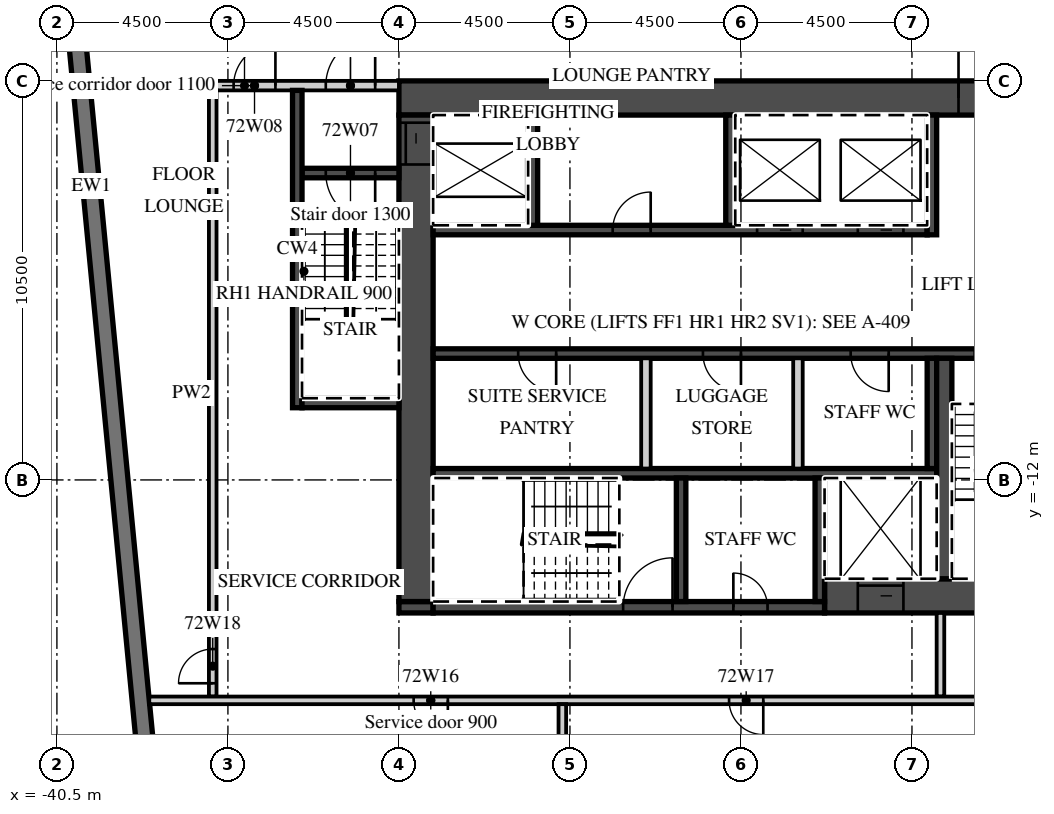
"""IFC4 building model, lengths in metres.
Left out: names, types, materials, properties, quantities, classifications, styles, units other than length and angle.
Written with IfcOpenShell. Run it as: python <this file> out.ifc"""

import sys

from ifc_helpers import new_model, si_unit, direction, frame, frame_2d, origin, place, context, subcontext, project, spatial, rectangle, extrude, element, fill, save


model = new_model("IFC4")
c1 = context("Model", 3, precision=1e-05, world=origin(), true_north=direction((0.0, 1.0)))
c2 = subcontext(c1, "Body", "Model", "MODEL_VIEW")
j1 = project(units=[si_unit("LENGTHUNIT", "METRE"), si_unit("PLANEANGLEUNIT", "RADIAN")], contexts=[c1])
p1 = place(None, origin())
s1 = spatial("IfcSite", under=j1, at=p1, CompositionType="ELEMENT")
p2 = place(p1, origin())
s2 = spatial("IfcBuilding", under=s1, at=p2, CompositionType="ELEMENT")
p3 = place(p2, frame((0.0, 0.0, 288.3)))
s3 = spatial("IfcBuildingStorey", under=s2, at=p3, CompositionType="ELEMENT", Elevation=288.3)
p4 = place(p3, frame((-41.132, 11.658, 0.0), z_axis=(0.0, 0.0, 1.0), x_axis=(0.095847749461, -0.995396006082, 0.0)))
e1 = element("IfcWall", 1, at=p4, inside=s3, PredefinedType="SOLIDWALL", context=c2, shape_type="SweptSolid", body=[
    extrude(rectangle(XDim=32.0, YDim=0.45, at=frame_2d((16.0, 0.0))), origin(), (0.0, 0.0, 1.0), 3.02),
])
p5 = place(p4, frame((2.053, 0.0, 0.45)))
e2 = element("IfcOpeningElement", 2, at=p5, cuts=e1, PredefinedType="OPENING", context=c2, shape_type="SweptSolid", body=[
    extrude(rectangle(XDim=3.3, YDim=2.25, at=frame_2d((1.65, 1.125))), frame((0.0, 0.235, 0.0), z_axis=(0.0, -1.0, 0.0), x_axis=(1.0, 0.0, 0.0)), (0.0, 0.0, 1.0), 0.47),
])
p6 = place(p4, frame((6.574, 0.0, 0.45)))
e3 = element("IfcOpeningElement", 3, at=p6, cuts=e1, PredefinedType="OPENING", context=c2, shape_type="SweptSolid", body=[
    extrude(rectangle(XDim=3.3, YDim=2.25, at=frame_2d((1.65, 1.125))), frame((0.0, 0.235, 0.0), z_axis=(0.0, -1.0, 0.0), x_axis=(1.0, 0.0, 0.0)), (0.0, 0.0, 1.0), 0.47),
])
p7 = place(p3, frame((-31.5, -1.95, 0.0), z_axis=(0.0, 0.0, 1.0), x_axis=(1.0, 0.0, 0.0)))
e4 = element("IfcWall", 4, at=p7, inside=s3, PredefinedType="SHEAR", context=c2, shape_type="SweptSolid", body=[
    extrude(rectangle(XDim=18.0, YDim=0.9, at=frame_2d((9.0, 0.0))), origin(), (0.0, 0.0, 1.0), 3.02),
])
p8 = place(p7, frame((14.725, 0.0, 0.0)))
e5 = element("IfcOpeningElement", 5, at=p8, cuts=e4, PredefinedType="OPENING", context=c2, shape_type="SweptSolid", body=[
    extrude(rectangle(XDim=1.8, YDim=2.1, at=frame_2d((0.9, 1.05))), frame((0.0, 0.46, 0.0), z_axis=(0.0, -1.0, 0.0), x_axis=(1.0, 0.0, 0.0)), (0.0, 0.0, 1.0), 0.92),
])
p9 = place(p3, frame((-20.3, -15.05, 0.0), z_axis=(0.0, 0.0, 1.0), x_axis=(1.0, 0.0, 0.0)))
e6 = element("IfcWall", 6, at=p9, inside=s3, PredefinedType="SHEAR", context=c2, shape_type="SweptSolid", body=[
    extrude(rectangle(XDim=6.8, YDim=0.9, at=frame_2d((3.4, 0.0))), origin(), (0.0, 0.0, 1.0), 3.02),
])
p10 = place(p9, frame((0.875, 0.0, 0.0)))
e7 = element("IfcOpeningElement", 7, at=p10, cuts=e6, PredefinedType="OPENING", context=c2, shape_type="SweptSolid", body=[
    extrude(rectangle(XDim=1.2, YDim=2.1, at=frame_2d((0.6, 1.05))), frame((0.0, 0.46, 0.0), z_axis=(0.0, -1.0, 0.0), x_axis=(1.0, 0.0, 0.0)), (0.0, 0.0, 1.0), 0.92),
])
p11 = place(p3, frame((-31.5, -15.35, 0.0), z_axis=(0.0, 0.0, 1.0), x_axis=(1.0, 0.0, 0.0)))
e8 = element("IfcWall", 8, at=p11, inside=s3, PredefinedType="SHEAR", context=c2, shape_type="SweptSolid", body=[
    extrude(rectangle(XDim=0.9, YDim=0.3, at=frame_2d((0.45, 0.0))), origin(), (0.0, 0.0, 1.0), 3.02),
])
p12 = place(p3, frame((-30.6, -15.35, 0.0), z_axis=(0.0, 0.0, 1.0), x_axis=(1.0, 0.0, 0.0)))
e9 = element("IfcWall", 9, at=p12, inside=s3, PredefinedType="SHEAR", context=c2, shape_type="SweptSolid", body=[
    extrude(rectangle(XDim=10.3, YDim=0.3, at=frame_2d((5.15, 0.0))), origin(), (0.0, 0.0, 1.0), 3.02),
])
p13 = place(p12, frame((5.0, 0.0, 0.0)))
e10 = element("IfcOpeningElement", 10, at=p13, cuts=e9, PredefinedType="OPENING", context=c2, shape_type="SweptSolid", body=[
    extrude(rectangle(XDim=1.3, YDim=2.1, at=frame_2d((0.65, 1.05))), frame((0.0, 0.16, 0.0), z_axis=(0.0, -1.0, 0.0), x_axis=(1.0, 0.0, 0.0)), (0.0, 0.0, 1.0), 0.32),
])
p14 = place(p12, frame((7.9, 0.0, 0.0)))
e11 = element("IfcOpeningElement", 11, at=p14, cuts=e9, PredefinedType="OPENING", context=c2, shape_type="SweptSolid", body=[
    extrude(rectangle(XDim=0.9, YDim=2.1, at=frame_2d((0.45, 1.05))), frame((0.0, 0.16, 0.0), z_axis=(0.0, -1.0, 0.0), x_axis=(1.0, 0.0, 0.0)), (0.0, 0.0, 1.0), 0.32),
])
p15 = place(p3, frame((-31.05, -15.2, 0.0), z_axis=(0.0, 0.0, 1.0), x_axis=(0.0, 1.0, 0.0)))
e12 = element("IfcWall", 12, at=p15, inside=s3, PredefinedType="SHEAR", context=c2, shape_type="SweptSolid", body=[
    extrude(rectangle(XDim=12.8, YDim=0.9, at=frame_2d((6.4, 0.0))), origin(), (0.0, 0.0, 1.0), 3.02),
])
p16 = place(p15, frame((11.5, 0.0, 0.0)))
e13 = element("IfcOpeningElement", 13, at=p16, cuts=e12, PredefinedType="OPENING", context=c2, shape_type="SweptSolid", body=[
    extrude(rectangle(XDim=1.1, YDim=2.1, at=frame_2d((0.55, 1.05))), frame((0.0, 0.46, 0.0), z_axis=(0.0, -1.0, 0.0), x_axis=(1.0, 0.0, 0.0)), (0.0, 0.0, 1.0), 0.92),
])
p17 = place(p3, frame((-30.6, -5.425, 0.0), z_axis=(0.0, 0.0, 1.0), x_axis=(1.0, 0.0, 0.0)))
e14 = element("IfcWall", 14, at=p17, inside=s3, PredefinedType="SHEAR", context=c2, shape_type="SweptSolid", body=[
    extrude(rectangle(XDim=13.0, YDim=0.25, at=frame_2d((6.5, 0.0))), origin(), (0.0, 0.0, 1.0), 3.02),
])
p18 = place(p17, frame((8.525, 0.0, 0.0)))
e15 = element("IfcOpeningElement", 15, at=p18, cuts=e14, PredefinedType="OPENING", context=c2, shape_type="SweptSolid", body=[
    extrude(rectangle(XDim=1.2, YDim=2.1, at=frame_2d((0.6, 1.05))), frame((0.0, 0.135, 0.0), z_axis=(0.0, -1.0, 0.0), x_axis=(1.0, 0.0, 0.0)), (0.0, 0.0, 1.0), 0.27),
])
p19 = place(p17, frame((11.175, 0.0, 0.0)))
e16 = element("IfcOpeningElement", 16, at=p19, cuts=e14, PredefinedType="OPENING", context=c2, shape_type="SweptSolid", body=[
    extrude(rectangle(XDim=1.2, YDim=2.1, at=frame_2d((0.6, 1.05))), frame((0.0, 0.135, 0.0), z_axis=(0.0, -1.0, 0.0), x_axis=(1.0, 0.0, 0.0)), (0.0, 0.0, 1.0), 0.27),
])
p20 = place(p17, frame((4.725, 0.0, 0.0)))
e17 = element("IfcOpeningElement", 17, at=p20, cuts=e14, PredefinedType="OPENING", context=c2, shape_type="SweptSolid", body=[
    extrude(rectangle(XDim=1.0, YDim=2.1, at=frame_2d((0.5, 1.05))), frame((0.0, 0.135, 0.0), z_axis=(0.0, -1.0, 0.0), x_axis=(1.0, 0.0, 0.0)), (0.0, 0.0, 1.0), 0.27),
])
p21 = place(p3, frame((-17.475, -5.55, 0.0), z_axis=(0.0, 0.0, 1.0), x_axis=(0.0, 1.0, 0.0)))
e18 = element("IfcWall", 18, at=p21, inside=s3, PredefinedType="SHEAR", context=c2, shape_type="SweptSolid", body=[
    extrude(rectangle(XDim=3.15, YDim=0.25, at=frame_2d((1.575, 0.0))), origin(), (0.0, 0.0, 1.0), 3.02),
])
for number, where, z_axis, x_axis in (
    (19, (-27.975, -5.3, 0.0), (0.0, 0.0, 1.0), (0.0, 1.0, 0.0)),
    (20, (-22.775, -5.3, 0.0), (0.0, 0.0, 1.0), (0.0, 1.0, 0.0)),
):
    element("IfcWall", number, at=place(p3, frame(where, z_axis=z_axis, x_axis=x_axis)), inside=s3, PredefinedType="SHEAR", context=c2, shape_type="SweptSolid", body=[
        extrude(rectangle(XDim=2.9, YDim=0.25, at=frame_2d((1.45, 0.0))), origin(), (0.0, 0.0, 1.0), 3.02),
    ])
p22 = place(p3, frame((-30.6, -8.675, 0.0), z_axis=(0.0, 0.0, 1.0), x_axis=(1.0, 0.0, 0.0)))
e21 = element("IfcWall", 21, at=p22, inside=s3, PredefinedType="SHEAR", context=c2, shape_type="SweptSolid", body=[
    extrude(rectangle(XDim=16.2, YDim=0.25, at=frame_2d((8.1, 0.0))), origin(), (0.0, 0.0, 1.0), 3.02),
])
p23 = place(p22, frame((14.25, 0.0, 0.0)))
e22 = element("IfcOpeningElement", 22, at=p23, cuts=e21, PredefinedType="OPENING", context=c2, shape_type="SweptSolid", body=[
    extrude(rectangle(XDim=1.3, YDim=2.1, at=frame_2d((0.65, 1.05))), frame((0.0, 0.135, 0.0), z_axis=(0.0, -1.0, 0.0), x_axis=(1.0, 0.0, 0.0)), (0.0, 0.0, 1.0), 0.27),
])
p24 = place(p22, frame((2.238, 0.0, 0.0)))
e23 = element("IfcOpeningElement", 23, at=p24, cuts=e21, PredefinedType="OPENING", context=c2, shape_type="SweptSolid", body=[
    extrude(rectangle(XDim=1.0, YDim=2.1, at=frame_2d((0.5, 1.05))), frame((0.0, 0.135, 0.0), z_axis=(0.0, -1.0, 0.0), x_axis=(1.0, 0.0, 0.0)), (0.0, 0.0, 1.0), 0.27),
])
p25 = place(p22, frame((7.1, 0.0, 0.0)))
e24 = element("IfcOpeningElement", 24, at=p25, cuts=e21, PredefinedType="OPENING", context=c2, shape_type="SweptSolid", body=[
    extrude(rectangle(XDim=1.0, YDim=2.1, at=frame_2d((0.5, 1.05))), frame((0.0, 0.135, 0.0), z_axis=(0.0, -1.0, 0.0), x_axis=(1.0, 0.0, 0.0)), (0.0, 0.0, 1.0), 0.27),
])
p26 = place(p22, frame((10.988, 0.0, 0.0)))
e25 = element("IfcOpeningElement", 25, at=p26, cuts=e21, PredefinedType="OPENING", context=c2, shape_type="SweptSolid", body=[
    extrude(rectangle(XDim=1.0, YDim=2.1, at=frame_2d((0.5, 1.05))), frame((0.0, 0.135, 0.0), z_axis=(0.0, -1.0, 0.0), x_axis=(1.0, 0.0, 0.0)), (0.0, 0.0, 1.0), 0.27),
])
p27 = place(p3, frame((-30.6, -11.825, 0.0), z_axis=(0.0, 0.0, 1.0), x_axis=(1.0, 0.0, 0.0)))
e26 = element("IfcWall", 26, at=p27, inside=s3, PredefinedType="SHEAR", context=c2, shape_type="SweptSolid", body=[
    extrude(rectangle(XDim=13.25, YDim=0.25, at=frame_2d((6.625, 0.0))), origin(), (0.0, 0.0, 1.0), 3.02),
])
p28 = place(p3, frame((-17.475, -11.7, 0.0), z_axis=(0.0, 0.0, 1.0), x_axis=(0.0, 1.0, 0.0)))
e27 = element("IfcWall", 27, at=p28, inside=s3, PredefinedType="SHEAR", context=c2, shape_type="SweptSolid", body=[
    extrude(rectangle(XDim=2.9, YDim=0.25, at=frame_2d((1.45, 0.0))), origin(), (0.0, 0.0, 1.0), 3.02),
])
for number, where, z_axis, x_axis in (
    (28, (-25.0, -11.7, 0.0), (0.0, 0.0, 1.0), (0.0, 1.0, 0.0)),
    (29, (-21.0, -11.7, 0.0), (0.0, 0.0, 1.0), (0.0, 1.0, 0.0)),
):
    element("IfcWall", number, at=place(p3, frame(where, z_axis=z_axis, x_axis=x_axis)), inside=s3, PredefinedType="PARTITIONING", context=c2, shape_type="SweptSolid", body=[
        extrude(rectangle(XDim=2.9, YDim=0.25, at=frame_2d((1.45, 0.0))), origin(), (0.0, 0.0, 1.0), 3.02),
    ])
p29 = place(p3, frame((-17.15, -14.6, 0.0), z_axis=(0.0, 0.0, 1.0), x_axis=(0.0, 1.0, 0.0)))
e30 = element("IfcWall", 30, at=p29, inside=s3, PredefinedType="SHEAR", context=c2, shape_type="SweptSolid", body=[
    extrude(rectangle(XDim=5.8, YDim=0.4, at=frame_2d((2.9, 0.0))), origin(), (0.0, 0.0, 1.0), 3.02),
])
for number, where, z_axis, x_axis in (
    (31, (-20.425, -15.2, 0.0), (0.0, 0.0, 1.0), (0.0, 1.0, 0.0)),
    (32, (-24.075, -15.2, 0.0), (0.0, 0.0, 1.0), (0.0, 1.0, 0.0)),
):
    element("IfcWall", number, at=place(p3, frame(where, z_axis=z_axis, x_axis=x_axis)), inside=s3, PredefinedType="SHEAR", context=c2, shape_type="SweptSolid", body=[
        extrude(rectangle(XDim=3.25, YDim=0.25, at=frame_2d((1.625, 0.0))), origin(), (0.0, 0.0, 1.0), 3.02),
    ])
p30 = place(p3, frame((-39.627, -1.625, 0.0), z_axis=(0.0, 0.0, 1.0), x_axis=(1.0, 0.0, 0.0)))
e33 = element("IfcWall", 33, at=p30, inside=s3, PredefinedType="PARTITIONING", context=c2, shape_type="SweptSolid", body=[
    extrude(rectangle(XDim=8.127, YDim=0.25, at=frame_2d((4.063, 0.0))), origin(), (0.0, 0.0, 1.0), 3.02),
])
p31 = place(p30, frame((6.202, 0.0, 0.0)))
e34 = element("IfcOpeningElement", 34, at=p31, cuts=e33, PredefinedType="OPENING", context=c2, shape_type="SweptSolid", body=[
    extrude(rectangle(XDim=1.3, YDim=2.1, at=frame_2d((0.65, 1.05))), frame((0.0, 0.135, 0.0), z_axis=(0.0, -1.0, 0.0), x_axis=(1.0, 0.0, 0.0)), (0.0, 0.0, 1.0), 0.27),
])
p32 = place(p30, frame((3.777, 0.0, 0.0)))
e35 = element("IfcOpeningElement", 35, at=p32, cuts=e33, PredefinedType="OPENING", context=c2, shape_type="SweptSolid", body=[
    extrude(rectangle(XDim=1.1, YDim=2.1, at=frame_2d((0.55, 1.05))), frame((0.0, 0.135, 0.0), z_axis=(0.0, -1.0, 0.0), x_axis=(1.0, 0.0, 0.0)), (0.0, 0.0, 1.0), 0.27),
])
p33 = place(p3, frame((-34.05, -3.925, 0.0), z_axis=(0.0, 0.0, 1.0), x_axis=(1.0, 0.0, 0.0)))
e36 = element("IfcWall", 36, at=p33, inside=s3, PredefinedType="SHEAR", context=c2, shape_type="SweptSolid", body=[
    extrude(rectangle(XDim=2.55, YDim=0.25, at=frame_2d((1.275, 0.0))), origin(), (0.0, 0.0, 1.0), 3.02),
])
p34 = place(p33, frame((0.625, 0.0, 0.0)))
e37 = element("IfcOpeningElement", 37, at=p34, cuts=e36, PredefinedType="OPENING", context=c2, shape_type="SweptSolid", body=[
    extrude(rectangle(XDim=1.3, YDim=2.1, at=frame_2d((0.65, 1.05))), frame((0.0, 0.135, 0.0), z_axis=(0.0, -1.0, 0.0), x_axis=(1.0, 0.0, 0.0)), (0.0, 0.0, 1.0), 0.27),
])
p35 = place(p3, frame((-34.175, -10.1, 0.0), z_axis=(0.0, 0.0, 1.0), x_axis=(0.0, 1.0, 0.0)))
e38 = element("IfcWall", 38, at=p35, inside=s3, PredefinedType="SHEAR", context=c2, shape_type="SweptSolid", body=[
    extrude(rectangle(XDim=8.35, YDim=0.25, at=frame_2d((4.175, 0.0))), origin(), (0.0, 0.0, 1.0), 3.02),
])
p36 = place(p3, frame((-34.05, -9.975, 0.0), z_axis=(0.0, 0.0, 1.0), x_axis=(1.0, 0.0, 0.0)))
e39 = element("IfcWall", 39, at=p36, inside=s3, PredefinedType="SHEAR", context=c2, shape_type="SweptSolid", body=[
    extrude(rectangle(XDim=2.55, YDim=0.25, at=frame_2d((1.275, 0.0))), origin(), (0.0, 0.0, 1.0), 3.02),
])
p37 = place(p3, frame((-17.25, -17.7, 0.0), z_axis=(0.0, 0.0, 1.0), x_axis=(0.0, 1.0, 0.0)))
e40 = element("IfcWall", 40, at=p37, inside=s3, PredefinedType="PARTITIONING", context=c2, shape_type="SweptSolid", body=[
    extrude(rectangle(XDim=2.2, YDim=0.2, at=frame_2d((1.1, 0.0))), origin(), (0.0, 0.0, 1.0), 3.02),
])
p38 = place(p3, frame((-36.4, -17.7, 0.0), z_axis=(0.0, 0.0, 1.0), x_axis=(0.0, 1.0, 0.0)))
e41 = element("IfcWall", 41, at=p38, inside=s3, PredefinedType="PARTITIONING", context=c2, shape_type="SweptSolid", body=[
    extrude(rectangle(XDim=15.95, YDim=0.2, at=frame_2d((7.975, 0.0))), origin(), (0.0, 0.0, 1.0), 3.02),
])
p39 = place(p38, frame((0.35, 0.0, 0.0)))
e42 = element("IfcOpeningElement", 42, at=p39, cuts=e41, PredefinedType="OPENING", context=c2, shape_type="SweptSolid", body=[
    extrude(rectangle(XDim=0.9, YDim=2.1, at=frame_2d((0.45, 1.05))), frame((0.0, 0.11, 0.0), z_axis=(0.0, -1.0, 0.0), x_axis=(1.0, 0.0, 0.0)), (0.0, 0.0, 1.0), 0.22),
])
p40 = place(p3, frame((-38.07, -17.8, 0.0), z_axis=(0.0, 0.0, 1.0), x_axis=(1.0, 0.0, 0.0)))
e43 = element("IfcWall", 43, at=p40, inside=s3, PredefinedType="PARTITIONING", context=c2, shape_type="SweptSolid", body=[
    extrude(rectangle(XDim=24.47, YDim=0.2, at=frame_2d((12.235, 0.0))), origin(), (0.0, 0.0, 1.0), 3.02),
])
p41 = place(p40, frame((6.957, 0.0, 0.0)))
e44 = element("IfcOpeningElement", 44, at=p41, cuts=e43, PredefinedType="OPENING", context=c2, shape_type="SweptSolid", body=[
    extrude(rectangle(XDim=0.9, YDim=2.1, at=frame_2d((0.45, 1.05))), frame((0.0, 0.11, 0.0), z_axis=(0.0, -1.0, 0.0), x_axis=(1.0, 0.0, 0.0)), (0.0, 0.0, 1.0), 0.22),
])
p42 = place(p40, frame((15.257, 0.0, 0.0)))
e45 = element("IfcOpeningElement", 45, at=p42, cuts=e43, PredefinedType="OPENING", context=c2, shape_type="SweptSolid", body=[
    extrude(rectangle(XDim=0.9, YDim=2.1, at=frame_2d((0.45, 1.05))), frame((0.0, 0.11, 0.0), z_axis=(0.0, -1.0, 0.0), x_axis=(1.0, 0.0, 0.0)), (0.0, 0.0, 1.0), 0.22),
])
p43 = place(p3, frame((-27.2, -22.716, 0.0), z_axis=(0.0, 0.0, 1.0), x_axis=(0.0, 1.0, 0.0)))
e46 = element("IfcWall", 46, at=p43, inside=s3, PredefinedType="PARTITIONING", context=c2, shape_type="SweptSolid", body=[
    extrude(rectangle(XDim=4.816, YDim=0.2, at=frame_2d((2.408, 0.0))), origin(), (0.0, 0.0, 1.0), 3.02),
])
p44 = place(p18, origin())
e47 = element("IfcDoor", 47, at=p44, inside=s3, OperationType="SLIDING_TO_LEFT", PredefinedType="DOOR", context=c2, shape_type="SweptSolid", body=[
    extrude(rectangle(XDim=1.2, YDim=2.1, at=frame_2d((0.6, 1.05))), frame((0.0, 0.025, 0.0), z_axis=(0.0, -1.0, 0.0), x_axis=(1.0, 0.0, 0.0)), (0.0, 0.0, 1.0), 0.05),
])
fill(e15, e47)
p45 = place(p19, origin())
e48 = element("IfcDoor", 48, at=p45, inside=s3, OperationType="SLIDING_TO_RIGHT", PredefinedType="DOOR", context=c2, shape_type="SweptSolid", body=[
    extrude(rectangle(XDim=1.2, YDim=2.1, at=frame_2d((0.6, 1.05))), frame((0.0, 0.025, 0.0), z_axis=(0.0, -1.0, 0.0), x_axis=(1.0, 0.0, 0.0)), (0.0, 0.0, 1.0), 0.05),
])
fill(e16, e48)
p46 = place(p10, origin())
e49 = element("IfcDoor", 49, at=p46, inside=s3, OperationType="SLIDING_TO_LEFT", PredefinedType="DOOR", context=c2, shape_type="SweptSolid", body=[
    extrude(rectangle(XDim=1.2, YDim=2.1, at=frame_2d((0.6, 1.05))), frame((0.0, 0.025, 0.0), z_axis=(0.0, -1.0, 0.0), x_axis=(1.0, 0.0, 0.0)), (0.0, 0.0, 1.0), 0.05),
])
fill(e7, e49)
p47 = place(p16, origin())
e50 = element("IfcDoor", 50, at=p47, inside=s3, OperationType="SLIDING_TO_RIGHT", PredefinedType="DOOR", context=c2, shape_type="SweptSolid", body=[
    extrude(rectangle(XDim=1.1, YDim=2.1, at=frame_2d((0.55, 1.05))), frame((0.0, 0.025, 0.0), z_axis=(0.0, -1.0, 0.0), x_axis=(1.0, 0.0, 0.0)), (0.0, 0.0, 1.0), 0.05),
])
fill(e13, e50)
p48 = place(p8, origin())
e51 = element("IfcDoor", 51, at=p48, inside=s3, OperationType="DOUBLE_DOOR_DOUBLE_SWING", PredefinedType="DOOR", context=c2, shape_type="SweptSolid", body=[
    extrude(rectangle(XDim=1.8, YDim=2.1, at=frame_2d((0.9, 1.05))), frame((0.0, 0.025, 0.0), z_axis=(0.0, -1.0, 0.0), x_axis=(1.0, 0.0, 0.0)), (0.0, 0.0, 1.0), 0.05),
])
fill(e5, e51)
p49 = place(p31, origin())
e52 = element("IfcDoor", 52, at=p49, inside=s3, OperationType="SINGLE_SWING_RIGHT", PredefinedType="DOOR", context=c2, shape_type="SweptSolid", body=[
    extrude(rectangle(XDim=1.3, YDim=2.1, at=frame_2d((0.65, 1.05))), frame((0.0, 0.025, 0.0), z_axis=(0.0, -1.0, 0.0), x_axis=(1.0, 0.0, 0.0)), (0.0, 0.0, 1.0), 0.05),
])
fill(e34, e52)
p50 = place(p34, origin())
e53 = element("IfcDoor", 53, at=p50, inside=s3, OperationType="SINGLE_SWING_RIGHT", PredefinedType="DOOR", context=c2, shape_type="SweptSolid", body=[
    extrude(rectangle(XDim=1.3, YDim=2.1, at=frame_2d((0.65, 1.05))), frame((0.0, 0.025, 0.0), z_axis=(0.0, -1.0, 0.0), x_axis=(1.0, 0.0, 0.0)), (0.0, 0.0, 1.0), 0.05),
])
fill(e37, e53)
p51 = place(p32, origin())
e54 = element("IfcDoor", 54, at=p51, inside=s3, OperationType="SINGLE_SWING_RIGHT", PredefinedType="DOOR", context=c2, shape_type="SweptSolid", body=[
    extrude(rectangle(XDim=1.1, YDim=2.1, at=frame_2d((0.55, 1.05))), frame((0.0, 0.025, 0.0), z_axis=(0.0, -1.0, 0.0), x_axis=(1.0, 0.0, 0.0)), (0.0, 0.0, 1.0), 0.05),
])
fill(e35, e54)
p52 = place(p23, origin())
e55 = element("IfcDoor", 55, at=p52, inside=s3, OperationType="SINGLE_SWING_RIGHT", PredefinedType="DOOR", context=c2, shape_type="SweptSolid", body=[
    extrude(rectangle(XDim=1.3, YDim=2.1, at=frame_2d((0.65, 1.05))), frame((0.0, 0.025, 0.0), z_axis=(0.0, -1.0, 0.0), x_axis=(1.0, 0.0, 0.0)), (0.0, 0.0, 1.0), 0.05),
])
fill(e22, e55)
p53 = place(p13, origin())
e56 = element("IfcDoor", 56, at=p53, inside=s3, OperationType="SINGLE_SWING_RIGHT", PredefinedType="DOOR", context=c2, shape_type="SweptSolid", body=[
    extrude(rectangle(XDim=1.3, YDim=2.1, at=frame_2d((0.65, 1.05))), frame((0.0, 0.025, 0.0), z_axis=(0.0, -1.0, 0.0), x_axis=(1.0, 0.0, 0.0)), (0.0, 0.0, 1.0), 0.05),
])
fill(e10, e56)
p54 = place(p14, origin())
e57 = element("IfcDoor", 57, at=p54, inside=s3, OperationType="SINGLE_SWING_LEFT", PredefinedType="DOOR", context=c2, shape_type="SweptSolid", body=[
    extrude(rectangle(XDim=0.9, YDim=2.1, at=frame_2d((0.45, 1.05))), frame((0.0, 0.025, 0.0), z_axis=(0.0, -1.0, 0.0), x_axis=(1.0, 0.0, 0.0)), (0.0, 0.0, 1.0), 0.05),
])
fill(e11, e57)
p55 = place(p24, origin())
e58 = element("IfcDoor", 58, at=p55, inside=s3, OperationType="SINGLE_SWING_RIGHT", PredefinedType="DOOR", context=c2, shape_type="SweptSolid", body=[
    extrude(rectangle(XDim=1.0, YDim=2.1, at=frame_2d((0.5, 1.05))), frame((0.0, 0.025, 0.0), z_axis=(0.0, -1.0, 0.0), x_axis=(1.0, 0.0, 0.0)), (0.0, 0.0, 1.0), 0.05),
])
fill(e23, e58)
p56 = place(p25, origin())
e59 = element("IfcDoor", 59, at=p56, inside=s3, OperationType="SINGLE_SWING_RIGHT", PredefinedType="DOOR", context=c2, shape_type="SweptSolid", body=[
    extrude(rectangle(XDim=1.0, YDim=2.1, at=frame_2d((0.5, 1.05))), frame((0.0, 0.025, 0.0), z_axis=(0.0, -1.0, 0.0), x_axis=(1.0, 0.0, 0.0)), (0.0, 0.0, 1.0), 0.05),
])
fill(e24, e59)
p57 = place(p26, origin())
e60 = element("IfcDoor", 60, at=p57, inside=s3, OperationType="SINGLE_SWING_RIGHT", PredefinedType="DOOR", context=c2, shape_type="SweptSolid", body=[
    extrude(rectangle(XDim=1.0, YDim=2.1, at=frame_2d((0.5, 1.05))), frame((0.0, 0.025, 0.0), z_axis=(0.0, -1.0, 0.0), x_axis=(1.0, 0.0, 0.0)), (0.0, 0.0, 1.0), 0.05),
])
fill(e25, e60)
p58 = place(p20, origin())
e61 = element("IfcDoor", 61, at=p58, inside=s3, OperationType="SINGLE_SWING_RIGHT", PredefinedType="DOOR", context=c2, shape_type="SweptSolid", body=[
    extrude(rectangle(XDim=1.0, YDim=2.1, at=frame_2d((0.5, 1.05))), frame((0.0, 0.025, 0.0), z_axis=(0.0, -1.0, 0.0), x_axis=(1.0, 0.0, 0.0)), (0.0, 0.0, 1.0), 0.05),
])
fill(e17, e61)
p59 = place(p41, origin())
e62 = element("IfcDoor", 62, at=p59, inside=s3, OperationType="SINGLE_SWING_RIGHT", PredefinedType="DOOR", context=c2, shape_type="SweptSolid", body=[
    extrude(rectangle(XDim=0.9, YDim=2.1, at=frame_2d((0.45, 1.05))), frame((0.0, 0.025, 0.0), z_axis=(0.0, -1.0, 0.0), x_axis=(1.0, 0.0, 0.0)), (0.0, 0.0, 1.0), 0.05),
])
fill(e44, e62)
p60 = place(p42, origin())
e63 = element("IfcDoor", 63, at=p60, inside=s3, OperationType="SINGLE_SWING_RIGHT", PredefinedType="DOOR", context=c2, shape_type="SweptSolid", body=[
    extrude(rectangle(XDim=0.9, YDim=2.1, at=frame_2d((0.45, 1.05))), frame((0.0, 0.025, 0.0), z_axis=(0.0, -1.0, 0.0), x_axis=(1.0, 0.0, 0.0)), (0.0, 0.0, 1.0), 0.05),
])
fill(e45, e63)
p61 = place(p39, origin())
e64 = element("IfcDoor", 64, at=p61, inside=s3, OperationType="SINGLE_SWING_LEFT", PredefinedType="DOOR", context=c2, shape_type="SweptSolid", body=[
    extrude(rectangle(XDim=0.9, YDim=2.1, at=frame_2d((0.45, 1.05))), frame((0.0, 0.025, 0.0), z_axis=(0.0, -1.0, 0.0), x_axis=(1.0, 0.0, 0.0)), (0.0, 0.0, 1.0), 0.05),
])
fill(e42, e64)
save(model, sys.argv[1])
